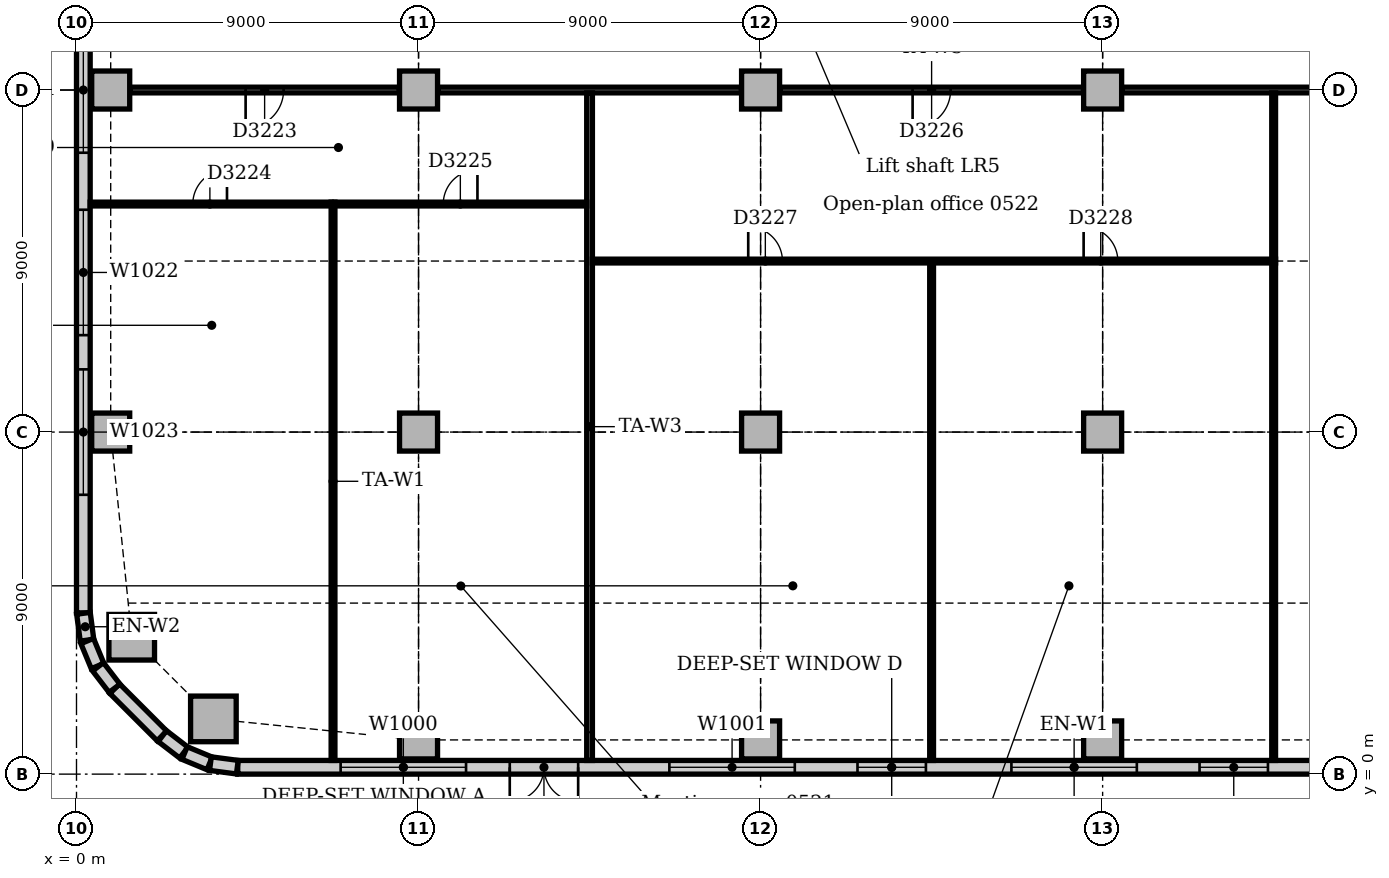
"""IFC4 building model, lengths in metres.
Left out: names, types, materials, properties, quantities, classifications, styles, units other than length and angle.
Written with IfcOpenShell. Run it as: python <this file> out.ifc"""

import sys

from ifc_helpers import new_model, si_unit, direction, frame, frame_2d, origin, origin_2d, place, context, subcontext, project, spatial, rectangle, extrude, element, fill, save


model = new_model("IFC4")
c1 = context("Model", 3, precision=1e-05, world=origin(), true_north=direction((0.0, 1.0)))
c2 = subcontext(c1, "Body", "Model", "MODEL_VIEW")
j1 = project(units=[si_unit("LENGTHUNIT", "METRE"), si_unit("PLANEANGLEUNIT", "RADIAN")], contexts=[c1])
p1 = place(None, origin())
s1 = spatial("IfcSite", under=j1, at=p1, CompositionType="ELEMENT")
p2 = place(p1, origin())
s2 = spatial("IfcBuilding", under=s1, at=p2, CompositionType="ELEMENT")
p3 = place(p2, frame((0.0, 0.0, 26.0)))
s3 = spatial("IfcBuildingStorey", under=s2, at=p3, CompositionType="ELEMENT", Elevation=26.0)
for number, where, z_axis, x_axis in (
    (1, (3.602, 1.453, 0.0), (0.0, 0.0, 1.0), (1.0, 0.0, 0.0)),
    (2, (1.453, 3.602, 0.0), (0.0, 0.0, 1.0), (1.0, 0.0, 0.0)),
):
    element("IfcColumn", number, at=place(p3, frame(where, z_axis=z_axis, x_axis=x_axis)), inside=s3, PredefinedType="COLUMN", context=c2, shape_type="SweptSolid", body=[
        extrude(rectangle(XDim=1.2, YDim=1.2, at=origin_2d()), origin(), (0.0, 0.0, 1.0), 3.85),
    ])
for number, where, z_axis, x_axis in (
    (3, (9.0, 0.9, 0.0), (0.0, 0.0, 1.0), (1.0, 0.0, 0.0)),
    (4, (18.0, 0.9, 0.0), (0.0, 0.0, 1.0), (1.0, 0.0, 0.0)),
    (5, (27.0, 0.9, 0.0), (0.0, 0.0, 1.0), (1.0, 0.0, 0.0)),
    (6, (0.9, 9.0, 0.0), (0.0, 0.0, 1.0), (1.0, 0.0, 0.0)),
    (7, (0.9, 18.0, 0.0), (0.0, 0.0, 1.0), (1.0, 0.0, 0.0)),
    (8, (9.0, 9.0, 0.0), (0.0, 0.0, 1.0), (1.0, 0.0, 0.0)),
    (9, (9.0, 18.0, 0.0), (0.0, 0.0, 1.0), (1.0, 0.0, 0.0)),
    (10, (18.0, 9.0, 0.0), (0.0, 0.0, 1.0), (1.0, 0.0, 0.0)),
    (11, (18.0, 18.0, 0.0), (0.0, 0.0, 1.0), (1.0, 0.0, 0.0)),
    (12, (27.0, 9.0, 0.0), (0.0, 0.0, 1.0), (1.0, 0.0, 0.0)),
    (13, (27.0, 18.0, 0.0), (0.0, 0.0, 1.0), (1.0, 0.0, 0.0)),
):
    element("IfcColumn", number, at=place(p3, frame(where, z_axis=z_axis, x_axis=x_axis)), inside=s3, PredefinedType="COLUMN", context=c2, shape_type="SweptSolid", body=[
        extrude(rectangle(XDim=1.0, YDim=1.0, at=origin_2d()), origin(), (0.0, 0.0, 1.0), 3.85),
    ])
p4 = place(p3, frame((4.243, 0.18, 0.0), z_axis=(0.0, 0.0, 1.0), x_axis=(1.0, 0.0, 0.0)))
e14 = element("IfcWall", 14, at=p4, inside=s3, PredefinedType="STANDARD", context=c2, shape_type="SweptSolid", body=[
    extrude(rectangle(XDim=44.015, YDim=0.36, at=frame_2d((22.007, 0.0))), origin(), (0.0, 0.0, 1.0), 3.85),
])
p5 = place(p4, frame((2.707, 0.0, 0.9)))
e15 = element("IfcOpeningElement", 15, at=p5, cuts=e14, PredefinedType="OPENING", context=c2, shape_type="SweptSolid", body=[
    extrude(rectangle(XDim=3.3, YDim=1.6, at=frame_2d((1.65, 0.8))), frame((0.0, 0.19, 0.0), z_axis=(0.0, -1.0, 0.0), x_axis=(1.0, 0.0, 0.0)), (0.0, 0.0, 1.0), 0.38),
])
p6 = place(p4, frame((7.157, 0.0, 0.0)))
e16 = element("IfcOpeningElement", 16, at=p6, cuts=e14, PredefinedType="OPENING", context=c2, shape_type="SweptSolid", body=[
    extrude(rectangle(XDim=1.8, YDim=2.4, at=frame_2d((0.9, 1.2))), frame((0.0, 0.19, 0.0), z_axis=(0.0, -1.0, 0.0), x_axis=(1.0, 0.0, 0.0)), (0.0, 0.0, 1.0), 0.38),
])
p7 = place(p4, frame((11.357, 0.0, 0.9)))
e17 = element("IfcOpeningElement", 17, at=p7, cuts=e14, PredefinedType="OPENING", context=c2, shape_type="SweptSolid", body=[
    extrude(rectangle(XDim=3.3, YDim=1.6, at=frame_2d((1.65, 0.8))), frame((0.0, 0.19, 0.0), z_axis=(0.0, -1.0, 0.0), x_axis=(1.0, 0.0, 0.0)), (0.0, 0.0, 1.0), 0.38),
])
p8 = place(p4, frame((16.307, 0.0, 0.9)))
e18 = element("IfcOpeningElement", 18, at=p8, cuts=e14, PredefinedType="OPENING", context=c2, shape_type="SweptSolid", body=[
    extrude(rectangle(XDim=1.8, YDim=1.6, at=frame_2d((0.9, 0.8))), frame((0.0, 0.19, 0.0), z_axis=(0.0, -1.0, 0.0), x_axis=(1.0, 0.0, 0.0)), (0.0, 0.0, 1.0), 0.38),
])
p9 = place(p4, frame((20.357, 0.0, 0.9)))
e19 = element("IfcOpeningElement", 19, at=p9, cuts=e14, PredefinedType="OPENING", context=c2, shape_type="SweptSolid", body=[
    extrude(rectangle(XDim=3.3, YDim=1.6, at=frame_2d((1.65, 0.8))), frame((0.0, 0.19, 0.0), z_axis=(0.0, -1.0, 0.0), x_axis=(1.0, 0.0, 0.0)), (0.0, 0.0, 1.0), 0.38),
])
p10 = place(p4, frame((25.307, 0.0, 0.9)))
e20 = element("IfcOpeningElement", 20, at=p10, cuts=e14, PredefinedType="OPENING", context=c2, shape_type="SweptSolid", body=[
    extrude(rectangle(XDim=1.8, YDim=1.6, at=frame_2d((0.9, 0.8))), frame((0.0, 0.19, 0.0), z_axis=(0.0, -1.0, 0.0), x_axis=(1.0, 0.0, 0.0)), (0.0, 0.0, 1.0), 0.38),
])
p11 = place(p4, frame((29.357, 0.0, 0.9)))
e21 = element("IfcOpeningElement", 21, at=p11, cuts=e14, PredefinedType="OPENING", context=c2, shape_type="SweptSolid", body=[
    extrude(rectangle(XDim=3.3, YDim=1.6, at=frame_2d((1.65, 0.8))), frame((0.0, 0.19, 0.0), z_axis=(0.0, -1.0, 0.0), x_axis=(1.0, 0.0, 0.0)), (0.0, 0.0, 1.0), 0.38),
])
p12 = place(p4, frame((33.857, 0.0, 0.9)))
e22 = element("IfcOpeningElement", 22, at=p12, cuts=e14, PredefinedType="OPENING", context=c2, shape_type="SweptSolid", body=[
    extrude(rectangle(XDim=3.3, YDim=1.6, at=frame_2d((1.65, 0.8))), frame((0.0, 0.19, 0.0), z_axis=(0.0, -1.0, 0.0), x_axis=(1.0, 0.0, 0.0)), (0.0, 0.0, 1.0), 0.38),
])
p13 = place(p4, frame((38.357, 0.0, 0.9)))
e23 = element("IfcOpeningElement", 23, at=p13, cuts=e14, PredefinedType="OPENING", context=c2, shape_type="SweptSolid", body=[
    extrude(rectangle(XDim=3.3, YDim=1.6, at=frame_2d((1.65, 0.8))), frame((0.0, 0.19, 0.0), z_axis=(0.0, -1.0, 0.0), x_axis=(1.0, 0.0, 0.0)), (0.0, 0.0, 1.0), 0.38),
])
p14 = place(p3, frame((0.18, 21.0, 0.0), z_axis=(0.0, 0.0, 1.0), x_axis=(0.0, -1.0, 0.0)))
e24 = element("IfcWall", 24, at=p14, inside=s3, PredefinedType="STANDARD", context=c2, shape_type="SweptSolid", body=[
    extrude(rectangle(XDim=16.757, YDim=0.36, at=frame_2d((8.379, 0.0))), origin(), (0.0, 0.0, 1.0), 3.85),
])
p15 = place(p14, frame((1.35, 0.0, 0.9)))
e25 = element("IfcOpeningElement", 25, at=p15, cuts=e24, PredefinedType="OPENING", context=c2, shape_type="SweptSolid", body=[
    extrude(rectangle(XDim=3.3, YDim=1.6, at=frame_2d((1.65, 0.8))), frame((0.0, 0.19, 0.0), z_axis=(0.0, -1.0, 0.0), x_axis=(1.0, 0.0, 0.0)), (0.0, 0.0, 1.0), 0.38),
])
p16 = place(p14, frame((6.15, 0.0, 0.9)))
e26 = element("IfcOpeningElement", 26, at=p16, cuts=e24, PredefinedType="OPENING", context=c2, shape_type="SweptSolid", body=[
    extrude(rectangle(XDim=3.3, YDim=1.6, at=frame_2d((1.65, 0.8))), frame((0.0, 0.19, 0.0), z_axis=(0.0, -1.0, 0.0), x_axis=(1.0, 0.0, 0.0)), (0.0, 0.0, 1.0), 0.38),
])
p17 = place(p14, frame((10.35, 0.0, 0.9)))
e27 = element("IfcOpeningElement", 27, at=p17, cuts=e24, PredefinedType="OPENING", context=c2, shape_type="SweptSolid", body=[
    extrude(rectangle(XDim=3.3, YDim=1.6, at=frame_2d((1.65, 0.8))), frame((0.0, 0.19, 0.0), z_axis=(0.0, -1.0, 0.0), x_axis=(1.0, 0.0, 0.0)), (0.0, 0.0, 1.0), 0.38),
])
p18 = place(p3, frame((1.006, 2.249, 0.0), z_axis=(0.0, 0.0, 1.0), x_axis=(0.707106781187, -0.707106781187, 0.0)))
e28 = element("IfcWall", 28, at=p18, inside=s3, PredefinedType="STANDARD", context=c2, shape_type="SweptSolid", body=[
    extrude(rectangle(XDim=1.757, YDim=0.36, at=frame_2d((0.879, 0.0))), origin(), (0.0, 0.0, 1.0), 3.85),
])
for number, where, z_axis, x_axis in (
    (29, (0.183, 4.231, 0.0), (0.0, 0.0, 1.0), (0.131, -0.991, 0.0)),
    (30, (0.282, 3.503, 0.0), (0.0, 0.0, 1.0), (0.383, -0.924, 0.0)),
):
    element("IfcWall", number, at=place(p3, frame(where, z_axis=z_axis, x_axis=x_axis)), inside=s3, PredefinedType="STANDARD", context=c2, shape_type="SweptSolid", body=[
        extrude(rectangle(XDim=0.713, YDim=0.36, at=frame_2d((0.356, 0.0))), origin(), (0.0, 0.0, 1.0), 3.85),
    ])
for number, where, z_axis, x_axis in (
    (31, (0.566, 2.825, 0.0), (0.0, 0.0, 1.0), (0.609, -0.793, 0.0)),
    (32, (2.259, 1.0, 0.0), (0.0, 0.0, 1.0), (0.793, -0.609, 0.0)),
):
    element("IfcWall", number, at=place(p3, frame(where, z_axis=z_axis, x_axis=x_axis)), inside=s3, PredefinedType="STANDARD", context=c2, shape_type="SweptSolid", body=[
        extrude(rectangle(XDim=0.713, YDim=0.36, at=frame_2d((0.357, 0.0))), origin(), (0.0, 0.0, 1.0), 3.85),
    ])
for number, where, z_axis, x_axis in (
    (33, (2.844, 0.555, 0.0), (0.0, 0.0, 1.0), (0.924, -0.383, 0.0)),
    (34, (3.524, 0.276, 0.0), (0.0, 0.0, 1.0), (0.991, -0.131, 0.0)),
):
    element("IfcWall", number, at=place(p3, frame(where, z_axis=z_axis, x_axis=x_axis)), inside=s3, PredefinedType="STANDARD", context=c2, shape_type="SweptSolid", body=[
        extrude(rectangle(XDim=0.713, YDim=0.36, at=frame_2d((0.356, 0.0))), origin(), (0.0, 0.0, 1.0), 3.85),
    ])
p19 = place(p3, frame((27.5, 18.0, 0.0), z_axis=(0.0, 0.0, 1.0), x_axis=(1.0, 0.0, 0.0)))
e35 = element("IfcWall", 35, at=p19, inside=s3, PredefinedType="PARTITIONING", context=c2, shape_type="SweptSolid", body=[
    extrude(rectangle(XDim=8.0, YDim=0.15, at=frame_2d((4.0, 0.0))), origin(), (0.0, 0.0, 1.0), 3.15),
])
p20 = place(p3, frame((18.5, 18.0, 0.0), z_axis=(0.0, 0.0, 1.0), x_axis=(1.0, 0.0, 0.0)))
e36 = element("IfcWall", 36, at=p20, inside=s3, PredefinedType="PARTITIONING", context=c2, shape_type="SweptSolid", body=[
    extrude(rectangle(XDim=8.0, YDim=0.15, at=frame_2d((4.0, 0.0))), origin(), (0.0, 0.0, 1.0), 3.15),
])
p21 = place(p20, frame((3.5, 0.0, 0.0)))
e37 = element("IfcOpeningElement", 37, at=p21, cuts=e36, PredefinedType="OPENING", context=c2, shape_type="SweptSolid", body=[
    extrude(rectangle(XDim=1.0, YDim=2.1, at=frame_2d((0.5, 1.05))), frame((0.0, 0.085, 0.0), z_axis=(0.0, -1.0, 0.0), x_axis=(1.0, 0.0, 0.0)), (0.0, 0.0, 1.0), 0.17),
])
p22 = place(p3, frame((9.5, 18.0, 0.0), z_axis=(0.0, 0.0, 1.0), x_axis=(1.0, 0.0, 0.0)))
e38 = element("IfcWall", 38, at=p22, inside=s3, PredefinedType="PARTITIONING", context=c2, shape_type="SweptSolid", body=[
    extrude(rectangle(XDim=8.0, YDim=0.15, at=frame_2d((4.0, 0.0))), origin(), (0.0, 0.0, 1.0), 3.15),
])
p23 = place(p3, frame((1.4, 18.0, 0.0), z_axis=(0.0, 0.0, 1.0), x_axis=(1.0, 0.0, 0.0)))
e39 = element("IfcWall", 39, at=p23, inside=s3, PredefinedType="PARTITIONING", context=c2, shape_type="SweptSolid", body=[
    extrude(rectangle(XDim=7.1, YDim=0.15, at=frame_2d((3.55, 0.0))), origin(), (0.0, 0.0, 1.0), 3.15),
])
p24 = place(p23, frame((3.05, 0.0, 0.0)))
e40 = element("IfcOpeningElement", 40, at=p24, cuts=e39, PredefinedType="OPENING", context=c2, shape_type="SweptSolid", body=[
    extrude(rectangle(XDim=1.0, YDim=2.1, at=frame_2d((0.5, 1.05))), frame((0.0, 0.085, 0.0), z_axis=(0.0, -1.0, 0.0), x_axis=(1.0, 0.0, 0.0)), (0.0, 0.0, 1.0), 0.17),
])
p25 = place(p3, frame((13.5, 0.36, 0.0), z_axis=(0.0, 0.0, 1.0), x_axis=(0.0, 1.0, 0.0)))
e41 = element("IfcWall", 41, at=p25, inside=s3, PredefinedType="PARTITIONING", context=c2, shape_type="SweptSolid", body=[
    extrude(rectangle(XDim=17.565, YDim=0.15, at=frame_2d((8.783, 0.0))), origin(), (0.0, 0.0, 1.0), 3.85),
])
p26 = place(p3, frame((13.575, 13.5, 0.0), z_axis=(0.0, 0.0, 1.0), x_axis=(1.0, 0.0, 0.0)))
e42 = element("IfcWall", 42, at=p26, inside=s3, PredefinedType="PARTITIONING", context=c2, shape_type="SweptSolid", body=[
    extrude(rectangle(XDim=17.975, YDim=0.1, at=frame_2d((8.988, 0.0))), origin(), (0.0, 0.0, 1.0), 3.35),
])
p27 = place(p26, frame((4.1, 0.0, 0.0)))
e43 = element("IfcOpeningElement", 43, at=p27, cuts=e42, PredefinedType="OPENING", context=c2, shape_type="SweptSolid", body=[
    extrude(rectangle(XDim=0.9, YDim=2.1, at=frame_2d((0.45, 1.05))), frame((0.0, 0.06, 0.0), z_axis=(0.0, -1.0, 0.0), x_axis=(1.0, 0.0, 0.0)), (0.0, 0.0, 1.0), 0.12),
])
p28 = place(p26, frame((12.925, 0.0, 0.0)))
e44 = element("IfcOpeningElement", 44, at=p28, cuts=e42, PredefinedType="OPENING", context=c2, shape_type="SweptSolid", body=[
    extrude(rectangle(XDim=0.9, YDim=2.1, at=frame_2d((0.45, 1.05))), frame((0.0, 0.06, 0.0), z_axis=(0.0, -1.0, 0.0), x_axis=(1.0, 0.0, 0.0)), (0.0, 0.0, 1.0), 0.12),
])
p29 = place(p3, frame((31.5, 13.55, 0.0), z_axis=(0.0, 0.0, 1.0), x_axis=(0.0, 1.0, 0.0)))
e45 = element("IfcWall", 45, at=p29, inside=s3, PredefinedType="PARTITIONING", context=c2, shape_type="SweptSolid", body=[
    extrude(rectangle(XDim=4.375, YDim=0.1, at=frame_2d((2.188, 0.0))), origin(), (0.0, 0.0, 1.0), 3.85),
])
p30 = place(p3, frame((31.5, 0.36, 0.0), z_axis=(0.0, 0.0, 1.0), x_axis=(0.0, 1.0, 0.0)))
e46 = element("IfcWall", 46, at=p30, inside=s3, PredefinedType="PARTITIONING", context=c2, shape_type="SweptSolid", body=[
    extrude(rectangle(XDim=13.09, YDim=0.1, at=frame_2d((6.545, 0.0))), origin(), (0.0, 0.0, 1.0), 3.85),
])
p31 = place(p3, frame((6.75, 0.36, 0.0), z_axis=(0.0, 0.0, 1.0), x_axis=(0.0, 1.0, 0.0)))
e47 = element("IfcWall", 47, at=p31, inside=s3, PredefinedType="PARTITIONING", context=c2, shape_type="SweptSolid", body=[
    extrude(rectangle(XDim=14.69, YDim=0.1, at=frame_2d((7.345, 0.0))), origin(), (0.0, 0.0, 1.0), 3.85),
])
p32 = place(p3, frame((6.8, 15.0, 0.0), z_axis=(0.0, 0.0, 1.0), x_axis=(1.0, 0.0, 0.0)))
e48 = element("IfcWall", 48, at=p32, inside=s3, PredefinedType="PARTITIONING", context=c2, shape_type="SweptSolid", body=[
    extrude(rectangle(XDim=6.625, YDim=0.1, at=frame_2d((3.312, 0.0))), origin(), (0.0, 0.0, 1.0), 3.85),
])
p33 = place(p32, frame((2.85, 0.0, 0.0)))
e49 = element("IfcOpeningElement", 49, at=p33, cuts=e48, PredefinedType="OPENING", context=c2, shape_type="SweptSolid", body=[
    extrude(rectangle(XDim=0.9, YDim=2.1, at=frame_2d((0.45, 1.05))), frame((0.0, 0.06, 0.0), z_axis=(0.0, -1.0, 0.0), x_axis=(1.0, 0.0, 0.0)), (0.0, 0.0, 1.0), 0.12),
])
p34 = place(p3, frame((0.36, 15.0, 0.0), z_axis=(0.0, 0.0, 1.0), x_axis=(1.0, 0.0, 0.0)))
e50 = element("IfcWall", 50, at=p34, inside=s3, PredefinedType="PARTITIONING", context=c2, shape_type="SweptSolid", body=[
    extrude(rectangle(XDim=6.34, YDim=0.1, at=frame_2d((3.17, 0.0))), origin(), (0.0, 0.0, 1.0), 3.85),
])
p35 = place(p34, frame((2.7, 0.0, 0.0)))
e51 = element("IfcOpeningElement", 51, at=p35, cuts=e50, PredefinedType="OPENING", context=c2, shape_type="SweptSolid", body=[
    extrude(rectangle(XDim=0.9, YDim=2.1, at=frame_2d((0.45, 1.05))), frame((0.0, 0.06, 0.0), z_axis=(0.0, -1.0, 0.0), x_axis=(1.0, 0.0, 0.0)), (0.0, 0.0, 1.0), 0.12),
])
p36 = place(p3, frame((22.5, 0.36, 0.0), z_axis=(0.0, 0.0, 1.0), x_axis=(0.0, 1.0, 0.0)))
e52 = element("IfcWall", 52, at=p36, inside=s3, PredefinedType="PARTITIONING", context=c2, shape_type="SweptSolid", body=[
    extrude(rectangle(XDim=13.09, YDim=0.1, at=frame_2d((6.545, 0.0))), origin(), (0.0, 0.0, 1.0), 3.85),
])
p37 = place(p5, origin())
e53 = element("IfcWindow", 53, at=p37, inside=s3, PartitioningType="SINGLE_PANEL", PredefinedType="WINDOW", context=c2, shape_type="SweptSolid", body=[
    extrude(rectangle(XDim=3.3, YDim=1.6, at=frame_2d((1.65, 0.8))), frame((0.0, 0.13, 0.0), z_axis=(0.0, -1.0, 0.0), x_axis=(1.0, 0.0, 0.0)), (0.0, 0.0, 1.0), 0.06),
])
fill(e15, e53)
p38 = place(p6, frame((1.8, 0.0, 0.0), z_axis=(0.0, 0.0, 1.0), x_axis=(-1.0, 0.0, 0.0)))
e54 = element("IfcDoor", 54, at=p38, inside=s3, OperationType="DOUBLE_DOOR_SINGLE_SWING", PredefinedType="DOOR", context=c2, shape_type="SweptSolid", body=[
    extrude(rectangle(XDim=1.8, YDim=2.4, at=frame_2d((0.9, 1.2))), frame((0.0, -0.07, 0.0), z_axis=(0.0, -1.0, 0.0), x_axis=(1.0, 0.0, 0.0)), (0.0, 0.0, 1.0), 0.05),
])
fill(e16, e54)
p39 = place(p7, origin())
e55 = element("IfcWindow", 55, at=p39, inside=s3, PartitioningType="SINGLE_PANEL", PredefinedType="WINDOW", context=c2, shape_type="SweptSolid", body=[
    extrude(rectangle(XDim=3.3, YDim=1.6, at=frame_2d((1.65, 0.8))), frame((0.0, 0.13, 0.0), z_axis=(0.0, -1.0, 0.0), x_axis=(1.0, 0.0, 0.0)), (0.0, 0.0, 1.0), 0.06),
])
fill(e17, e55)
p40 = place(p8, origin())
e56 = element("IfcWindow", 56, at=p40, inside=s3, PartitioningType="SINGLE_PANEL", PredefinedType="WINDOW", context=c2, shape_type="SweptSolid", body=[
    extrude(rectangle(XDim=1.8, YDim=1.6, at=frame_2d((0.9, 0.8))), frame((0.0, 0.13, 0.0), z_axis=(0.0, -1.0, 0.0), x_axis=(1.0, 0.0, 0.0)), (0.0, 0.0, 1.0), 0.06),
])
fill(e18, e56)
p41 = place(p9, origin())
e57 = element("IfcWindow", 57, at=p41, inside=s3, PartitioningType="SINGLE_PANEL", PredefinedType="WINDOW", context=c2, shape_type="SweptSolid", body=[
    extrude(rectangle(XDim=3.3, YDim=1.6, at=frame_2d((1.65, 0.8))), frame((0.0, 0.13, 0.0), z_axis=(0.0, -1.0, 0.0), x_axis=(1.0, 0.0, 0.0)), (0.0, 0.0, 1.0), 0.06),
])
fill(e19, e57)
p42 = place(p10, origin())
e58 = element("IfcWindow", 58, at=p42, inside=s3, PartitioningType="SINGLE_PANEL", PredefinedType="WINDOW", context=c2, shape_type="SweptSolid", body=[
    extrude(rectangle(XDim=1.8, YDim=1.6, at=frame_2d((0.9, 0.8))), frame((0.0, 0.13, 0.0), z_axis=(0.0, -1.0, 0.0), x_axis=(1.0, 0.0, 0.0)), (0.0, 0.0, 1.0), 0.06),
])
fill(e20, e58)
p43 = place(p15, origin())
e59 = element("IfcWindow", 59, at=p43, inside=s3, PartitioningType="SINGLE_PANEL", PredefinedType="WINDOW", context=c2, shape_type="SweptSolid", body=[
    extrude(rectangle(XDim=3.3, YDim=1.6, at=frame_2d((1.65, 0.8))), frame((0.0, 0.13, 0.0), z_axis=(0.0, -1.0, 0.0), x_axis=(1.0, 0.0, 0.0)), (0.0, 0.0, 1.0), 0.06),
])
fill(e25, e59)
p44 = place(p16, origin())
e60 = element("IfcWindow", 60, at=p44, inside=s3, PartitioningType="SINGLE_PANEL", PredefinedType="WINDOW", context=c2, shape_type="SweptSolid", body=[
    extrude(rectangle(XDim=3.3, YDim=1.6, at=frame_2d((1.65, 0.8))), frame((0.0, 0.13, 0.0), z_axis=(0.0, -1.0, 0.0), x_axis=(1.0, 0.0, 0.0)), (0.0, 0.0, 1.0), 0.06),
])
fill(e26, e60)
p45 = place(p17, origin())
e61 = element("IfcWindow", 61, at=p45, inside=s3, PartitioningType="SINGLE_PANEL", PredefinedType="WINDOW", context=c2, shape_type="SweptSolid", body=[
    extrude(rectangle(XDim=3.3, YDim=1.6, at=frame_2d((1.65, 0.8))), frame((0.0, 0.13, 0.0), z_axis=(0.0, -1.0, 0.0), x_axis=(1.0, 0.0, 0.0)), (0.0, 0.0, 1.0), 0.06),
])
fill(e27, e61)
p46 = place(p24, frame((1.0, 0.0, 0.0), z_axis=(0.0, 0.0, 1.0), x_axis=(-1.0, 0.0, 0.0)))
e62 = element("IfcDoor", 62, at=p46, inside=s3, OperationType="SINGLE_SWING_RIGHT", PredefinedType="DOOR", context=c2, shape_type="SweptSolid", body=[
    extrude(rectangle(XDim=1.0, YDim=2.1, at=frame_2d((0.5, 1.05))), frame((0.0, 0.025, 0.0), z_axis=(0.0, -1.0, 0.0), x_axis=(1.0, 0.0, 0.0)), (0.0, 0.0, 1.0), 0.05),
])
fill(e40, e62)
p47 = place(p35, origin())
e63 = element("IfcDoor", 63, at=p47, inside=s3, OperationType="SINGLE_SWING_RIGHT", PredefinedType="DOOR", context=c2, shape_type="SweptSolid", body=[
    extrude(rectangle(XDim=0.9, YDim=2.1, at=frame_2d((0.45, 1.05))), frame((0.0, 0.025, 0.0), z_axis=(0.0, -1.0, 0.0), x_axis=(1.0, 0.0, 0.0)), (0.0, 0.0, 1.0), 0.05),
])
fill(e51, e63)
p48 = place(p33, origin())
e64 = element("IfcDoor", 64, at=p48, inside=s3, OperationType="SINGLE_SWING_RIGHT", PredefinedType="DOOR", context=c2, shape_type="SweptSolid", body=[
    extrude(rectangle(XDim=0.9, YDim=2.1, at=frame_2d((0.45, 1.05))), frame((0.0, 0.025, 0.0), z_axis=(0.0, -1.0, 0.0), x_axis=(1.0, 0.0, 0.0)), (0.0, 0.0, 1.0), 0.05),
])
fill(e49, e64)
p49 = place(p21, frame((1.0, 0.0, 0.0), z_axis=(0.0, 0.0, 1.0), x_axis=(-1.0, 0.0, 0.0)))
e65 = element("IfcDoor", 65, at=p49, inside=s3, OperationType="SINGLE_SWING_RIGHT", PredefinedType="DOOR", context=c2, shape_type="SweptSolid", body=[
    extrude(rectangle(XDim=1.0, YDim=2.1, at=frame_2d((0.5, 1.05))), frame((0.0, 0.025, 0.0), z_axis=(0.0, -1.0, 0.0), x_axis=(1.0, 0.0, 0.0)), (0.0, 0.0, 1.0), 0.05),
])
fill(e37, e65)
p50 = place(p27, origin())
e66 = element("IfcDoor", 66, at=p50, inside=s3, OperationType="SINGLE_SWING_LEFT", PredefinedType="DOOR", context=c2, shape_type="SweptSolid", body=[
    extrude(rectangle(XDim=0.9, YDim=2.1, at=frame_2d((0.45, 1.05))), frame((0.0, 0.025, 0.0), z_axis=(0.0, -1.0, 0.0), x_axis=(1.0, 0.0, 0.0)), (0.0, 0.0, 1.0), 0.05),
])
fill(e43, e66)
p51 = place(p28, origin())
e67 = element("IfcDoor", 67, at=p51, inside=s3, OperationType="SINGLE_SWING_LEFT", PredefinedType="DOOR", context=c2, shape_type="SweptSolid", body=[
    extrude(rectangle(XDim=0.9, YDim=2.1, at=frame_2d((0.45, 1.05))), frame((0.0, 0.025, 0.0), z_axis=(0.0, -1.0, 0.0), x_axis=(1.0, 0.0, 0.0)), (0.0, 0.0, 1.0), 0.05),
])
fill(e44, e67)
save(model, sys.argv[1])
